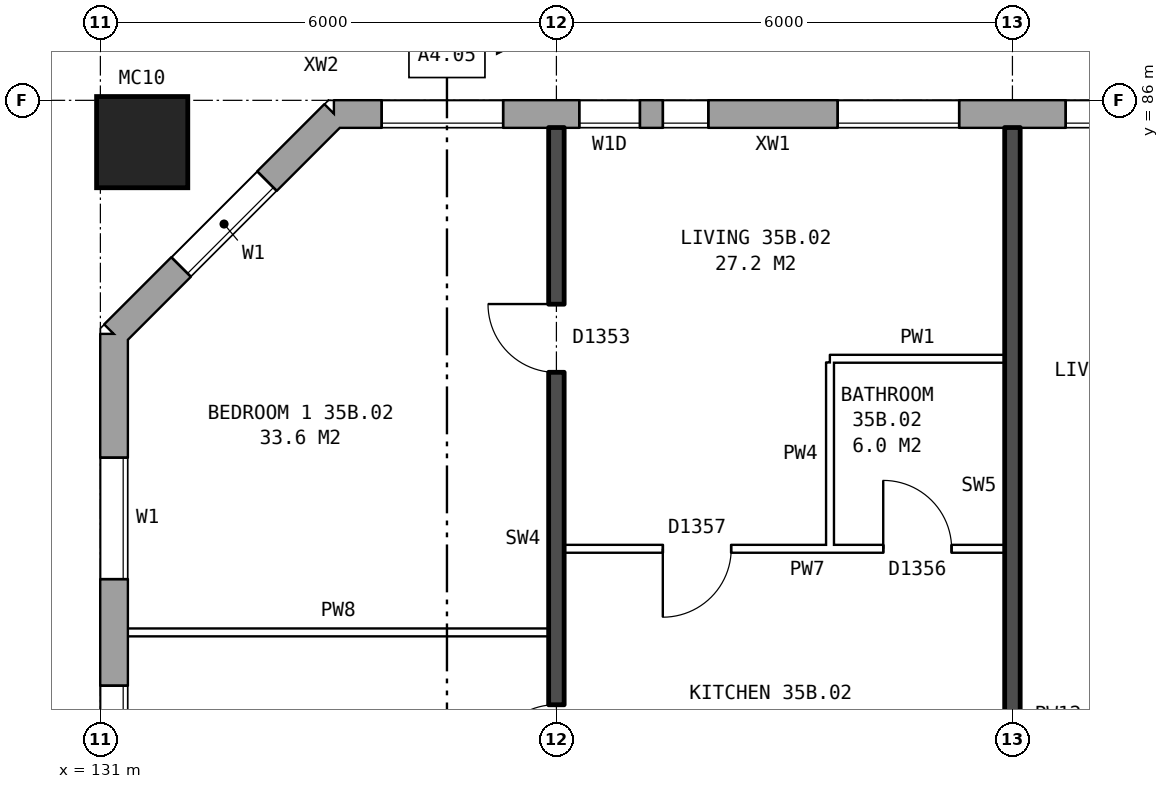
"""IFC4 building model, lengths in metres.
Left out: names, types, materials, properties, quantities, classifications, styles, units other than length and angle.
Written with IfcOpenShell. Run it as: python <this file> out.ifc"""

import sys

from ifc_helpers import new_model, si_unit, direction, frame, frame_2d, origin, origin_2d, place, context, subcontext, project, spatial, rectangle, hollow_rectangle, extrude, element, fill, save


model = new_model("IFC4")
c1 = context("Model", 3, precision=1e-05, world=origin(), true_north=direction((0.0, 1.0)))
c2 = subcontext(c1, "Body", "Model", "MODEL_VIEW")
j1 = project(units=[si_unit("LENGTHUNIT", "METRE"), si_unit("PLANEANGLEUNIT", "RADIAN")], contexts=[c1])
p1 = place(None, origin())
s1 = spatial("IfcSite", under=j1, at=p1, CompositionType="ELEMENT")
p2 = place(p1, origin())
s2 = spatial("IfcBuilding", under=s1, at=p2, CompositionType="ELEMENT")
p3 = place(p2, frame((0.0, 0.0, 126.8)))
s3 = spatial("IfcBuildingStorey", under=s2, at=p3, CompositionType="ELEMENT", Elevation=126.8)
p4 = place(p3, frame((131.55, 85.45, 0.0), z_axis=(0.0, 0.0, 1.0), x_axis=(1.0, 0.0, 0.0)))
e1 = element("IfcColumn", 1, at=p4, inside=s3, PredefinedType="COLUMN", context=c2, shape_type="SweptSolid", body=[
    extrude(hollow_rectangle(XDim=1.2, YDim=1.2, WallThickness=0.065, at=origin_2d()), origin(), (0.0, 0.0, 1.0), 3.1),
])
p5 = place(p3, frame((169.675, 85.82, 0.0), z_axis=(0.0, 0.0, 1.0), x_axis=(-1.0, 0.0, 0.0)))
e2 = element("IfcWall", 2, at=p5, inside=s3, PredefinedType="STANDARD", context=c2, shape_type="SweptSolid", body=[
    extrude(rectangle(XDim=35.601, YDim=0.36, at=frame_2d((17.8, 0.0))), origin(), (0.0, 0.0, 1.0), 2.85),
])
p6 = place(p5, frame((0.375, 0.0, 0.8)))
e3 = element("IfcOpeningElement", 3, at=p6, cuts=e2, PredefinedType="OPENING", context=c2, shape_type="SweptSolid", body=[
    extrude(rectangle(XDim=1.6, YDim=1.8, at=frame_2d((0.8, 0.9))), frame((0.0, 0.19, 0.0), z_axis=(0.0, -1.0, 0.0), x_axis=(1.0, 0.0, 0.0)), (0.0, 0.0, 1.0), 0.38),
])
p7 = place(p5, frame((2.875, 0.0, 0.8)))
e4 = element("IfcOpeningElement", 4, at=p7, cuts=e2, PredefinedType="OPENING", context=c2, shape_type="SweptSolid", body=[
    extrude(rectangle(XDim=1.0, YDim=1.8, at=frame_2d((0.5, 0.9))), frame((0.0, 0.19, 0.0), z_axis=(0.0, -1.0, 0.0), x_axis=(1.0, 0.0, 0.0)), (0.0, 0.0, 1.0), 0.38),
])
p8 = place(p5, frame((4.175, 0.0, 1.6)))
e5 = element("IfcOpeningElement", 5, at=p8, cuts=e2, PredefinedType="OPENING", context=c2, shape_type="SweptSolid", body=[
    extrude(rectangle(XDim=0.6, YDim=0.9, at=frame_2d((0.3, 0.45))), frame((0.0, 0.19, 0.0), z_axis=(0.0, -1.0, 0.0), x_axis=(1.0, 0.0, 0.0)), (0.0, 0.0, 1.0), 0.38),
])
p9 = place(p5, frame((9.375, 0.0, 0.8)))
e6 = element("IfcOpeningElement", 6, at=p9, cuts=e2, PredefinedType="OPENING", context=c2, shape_type="SweptSolid", body=[
    extrude(rectangle(XDim=1.6, YDim=1.8, at=frame_2d((0.8, 0.9))), frame((0.0, 0.19, 0.0), z_axis=(0.0, -1.0, 0.0), x_axis=(1.0, 0.0, 0.0)), (0.0, 0.0, 1.0), 0.38),
])
p10 = place(p5, frame((12.375, 0.0, 0.8)))
e7 = element("IfcOpeningElement", 7, at=p10, cuts=e2, PredefinedType="OPENING", context=c2, shape_type="SweptSolid", body=[
    extrude(rectangle(XDim=1.6, YDim=1.8, at=frame_2d((0.8, 0.9))), frame((0.0, 0.19, 0.0), z_axis=(0.0, -1.0, 0.0), x_axis=(1.0, 0.0, 0.0)), (0.0, 0.0, 1.0), 0.38),
])
p11 = place(p5, frame((15.375, 0.0, 0.8)))
e8 = element("IfcOpeningElement", 8, at=p11, cuts=e2, PredefinedType="OPENING", context=c2, shape_type="SweptSolid", body=[
    extrude(rectangle(XDim=1.6, YDim=1.8, at=frame_2d((0.8, 0.9))), frame((0.0, 0.19, 0.0), z_axis=(0.0, -1.0, 0.0), x_axis=(1.0, 0.0, 0.0)), (0.0, 0.0, 1.0), 0.38),
])
p12 = place(p5, frame((18.375, 0.0, 0.8)))
e9 = element("IfcOpeningElement", 9, at=p12, cuts=e2, PredefinedType="OPENING", context=c2, shape_type="SweptSolid", body=[
    extrude(rectangle(XDim=1.6, YDim=1.8, at=frame_2d((0.8, 0.9))), frame((0.0, 0.19, 0.0), z_axis=(0.0, -1.0, 0.0), x_axis=(1.0, 0.0, 0.0)), (0.0, 0.0, 1.0), 0.38),
])
p13 = place(p5, frame((21.375, 0.0, 0.8)))
e10 = element("IfcOpeningElement", 10, at=p13, cuts=e2, PredefinedType="OPENING", context=c2, shape_type="SweptSolid", body=[
    extrude(rectangle(XDim=1.6, YDim=1.8, at=frame_2d((0.8, 0.9))), frame((0.0, 0.19, 0.0), z_axis=(0.0, -1.0, 0.0), x_axis=(1.0, 0.0, 0.0)), (0.0, 0.0, 1.0), 0.38),
])
p14 = place(p5, frame((24.375, 0.0, 0.8)))
e11 = element("IfcOpeningElement", 11, at=p14, cuts=e2, PredefinedType="OPENING", context=c2, shape_type="SweptSolid", body=[
    extrude(rectangle(XDim=1.6, YDim=1.8, at=frame_2d((0.8, 0.9))), frame((0.0, 0.19, 0.0), z_axis=(0.0, -1.0, 0.0), x_axis=(1.0, 0.0, 0.0)), (0.0, 0.0, 1.0), 0.38),
])
p15 = place(p5, frame((27.375, 0.0, 0.8)))
e12 = element("IfcOpeningElement", 12, at=p15, cuts=e2, PredefinedType="OPENING", context=c2, shape_type="SweptSolid", body=[
    extrude(rectangle(XDim=1.6, YDim=1.8, at=frame_2d((0.8, 0.9))), frame((0.0, 0.19, 0.0), z_axis=(0.0, -1.0, 0.0), x_axis=(1.0, 0.0, 0.0)), (0.0, 0.0, 1.0), 0.38),
])
p16 = place(p5, frame((30.675, 0.0, 1.7)))
e13 = element("IfcOpeningElement", 13, at=p16, cuts=e2, PredefinedType="OPENING", context=c2, shape_type="SweptSolid", body=[
    extrude(rectangle(XDim=0.6, YDim=0.9, at=frame_2d((0.3, 0.45))), frame((0.0, 0.19, 0.0), z_axis=(0.0, -1.0, 0.0), x_axis=(1.0, 0.0, 0.0)), (0.0, 0.0, 1.0), 0.38),
])
p17 = place(p5, frame((33.375, 0.0, 0.8)))
e14 = element("IfcOpeningElement", 14, at=p17, cuts=e2, PredefinedType="OPENING", context=c2, shape_type="SweptSolid", body=[
    extrude(rectangle(XDim=1.6, YDim=1.8, at=frame_2d((0.8, 0.9))), frame((0.0, 0.19, 0.0), z_axis=(0.0, -1.0, 0.0), x_axis=(1.0, 0.0, 0.0)), (0.0, 0.0, 1.0), 0.38),
])
p18 = place(p5, frame((5.975, 0.0, 0.8)))
e15 = element("IfcOpeningElement", 15, at=p18, cuts=e2, PredefinedType="OPENING", context=c2, shape_type="SweptSolid", body=[
    extrude(rectangle(XDim=0.6, YDim=0.9, at=frame_2d((0.3, 0.45))), frame((0.0, 0.19, 0.0), z_axis=(0.0, -1.0, 0.0), x_axis=(1.0, 0.0, 0.0)), (0.0, 0.0, 1.0), 0.38),
])
p19 = place(p5, frame((6.875, 0.0, 0.8)))
e16 = element("IfcOpeningElement", 16, at=p19, cuts=e2, PredefinedType="OPENING", context=c2, shape_type="SweptSolid", body=[
    extrude(rectangle(XDim=1.6, YDim=1.8, at=frame_2d((0.8, 0.9))), frame((0.0, 0.19, 0.0), z_axis=(0.0, -1.0, 0.0), x_axis=(1.0, 0.0, 0.0)), (0.0, 0.0, 1.0), 0.38),
])
p20 = place(p5, frame((31.575, 0.0, 0.8)))
e17 = element("IfcOpeningElement", 17, at=p20, cuts=e2, PredefinedType="OPENING", context=c2, shape_type="SweptSolid", body=[
    extrude(rectangle(XDim=0.8, YDim=1.8, at=frame_2d((0.4, 0.9))), frame((0.0, 0.19, 0.0), z_axis=(0.0, -1.0, 0.0), x_axis=(1.0, 0.0, 0.0)), (0.0, 0.0, 1.0), 0.38),
])
p21 = place(p3, frame((134.075, 85.82, 0.0), z_axis=(0.0, 0.0, 1.0), x_axis=(-0.707106781187, -0.707106781187, 0.0)))
e18 = element("IfcWall", 18, at=p21, inside=s3, PredefinedType="STANDARD", context=c2, shape_type="SweptSolid", body=[
    extrude(rectangle(XDim=4.094, YDim=0.36, at=frame_2d((2.047, 0.0))), origin(), (0.0, 0.0, 1.0), 2.85),
])
p22 = place(p21, frame((1.247, 0.0, 0.8)))
e19 = element("IfcOpeningElement", 19, at=p22, cuts=e18, PredefinedType="OPENING", context=c2, shape_type="SweptSolid", body=[
    extrude(rectangle(XDim=1.6, YDim=1.8, at=frame_2d((0.8, 0.9))), frame((0.0, 0.19, 0.0), z_axis=(0.0, -1.0, 0.0), x_axis=(1.0, 0.0, 0.0)), (0.0, 0.0, 1.0), 0.38),
])
p23 = place(p3, frame((131.18, 82.925, 0.0), z_axis=(0.0, 0.0, 1.0), x_axis=(0.0, -1.0, 0.0)))
e20 = element("IfcWall", 20, at=p23, inside=s3, PredefinedType="STANDARD", context=c2, shape_type="SweptSolid", body=[
    extrude(rectangle(XDim=25.851, YDim=0.36, at=frame_2d((12.925, 0.0))), origin(), (0.0, 0.0, 1.0), 2.85),
])
p24 = place(p23, frame((1.625, 0.0, 0.8)))
e21 = element("IfcOpeningElement", 21, at=p24, cuts=e20, PredefinedType="OPENING", context=c2, shape_type="SweptSolid", body=[
    extrude(rectangle(XDim=1.6, YDim=1.8, at=frame_2d((0.8, 0.9))), frame((0.0, 0.19, 0.0), z_axis=(0.0, -1.0, 0.0), x_axis=(1.0, 0.0, 0.0)), (0.0, 0.0, 1.0), 0.38),
])
p25 = place(p23, frame((4.625, 0.0, 0.8)))
e22 = element("IfcOpeningElement", 22, at=p25, cuts=e20, PredefinedType="OPENING", context=c2, shape_type="SweptSolid", body=[
    extrude(rectangle(XDim=1.6, YDim=1.8, at=frame_2d((0.8, 0.9))), frame((0.0, 0.19, 0.0), z_axis=(0.0, -1.0, 0.0), x_axis=(1.0, 0.0, 0.0)), (0.0, 0.0, 1.0), 0.38),
])
p26 = place(p23, frame((19.625, 0.0, 0.8)))
e23 = element("IfcOpeningElement", 23, at=p26, cuts=e20, PredefinedType="OPENING", context=c2, shape_type="SweptSolid", body=[
    extrude(rectangle(XDim=1.6, YDim=1.8, at=frame_2d((0.8, 0.9))), frame((0.0, 0.19, 0.0), z_axis=(0.0, -1.0, 0.0), x_axis=(1.0, 0.0, 0.0)), (0.0, 0.0, 1.0), 0.38),
])
p27 = place(p23, frame((22.625, 0.0, 0.8)))
e24 = element("IfcOpeningElement", 24, at=p27, cuts=e20, PredefinedType="OPENING", context=c2, shape_type="SweptSolid", body=[
    extrude(rectangle(XDim=1.6, YDim=1.8, at=frame_2d((0.8, 0.9))), frame((0.0, 0.19, 0.0), z_axis=(0.0, -1.0, 0.0), x_axis=(1.0, 0.0, 0.0)), (0.0, 0.0, 1.0), 0.38),
])
p28 = place(p3, frame((131.36, 79.0, 0.0), z_axis=(0.0, 0.0, 1.0), x_axis=(1.0, 0.0, 0.0)))
e25 = element("IfcWall", 25, at=p28, inside=s3, PredefinedType="PARTITIONING", context=c2, shape_type="SweptSolid", body=[
    extrude(rectangle(XDim=5.54, YDim=0.1, at=frame_2d((2.77, 0.0))), origin(), (0.0, 0.0, 1.0), 2.85),
])
p29 = place(p3, frame((137.1, 80.1, 0.0), z_axis=(0.0, 0.0, 1.0), x_axis=(1.0, 0.0, 0.0)))
e26 = element("IfcWall", 26, at=p29, inside=s3, PredefinedType="PARTITIONING", context=c2, shape_type="SweptSolid", body=[
    extrude(rectangle(XDim=5.8, YDim=0.1, at=frame_2d((2.9, 0.0))), origin(), (0.0, 0.0, 1.0), 2.85),
])
p30 = place(p29, frame((1.3, 0.0, 0.0)))
e27 = element("IfcOpeningElement", 27, at=p30, cuts=e26, PredefinedType="OPENING", context=c2, shape_type="SweptSolid", body=[
    extrude(rectangle(XDim=0.9, YDim=2.1, at=frame_2d((0.45, 1.05))), frame((0.0, 0.06, 0.0), z_axis=(0.0, -1.0, 0.0), x_axis=(1.0, 0.0, 0.0)), (0.0, 0.0, 1.0), 0.12),
])
p31 = place(p29, frame((4.2, 0.0, 0.0)))
e28 = element("IfcOpeningElement", 28, at=p31, cuts=e26, PredefinedType="OPENING", context=c2, shape_type="SweptSolid", body=[
    extrude(rectangle(XDim=0.9, YDim=2.1, at=frame_2d((0.45, 1.05))), frame((0.0, 0.06, 0.0), z_axis=(0.0, -1.0, 0.0), x_axis=(1.0, 0.0, 0.0)), (0.0, 0.0, 1.0), 0.12),
])
p32 = place(p3, frame((140.6, 82.6, 0.0), z_axis=(0.0, 0.0, 1.0), x_axis=(1.0, 0.0, 0.0)))
e29 = element("IfcWall", 29, at=p32, inside=s3, PredefinedType="PARTITIONING", context=c2, shape_type="SweptSolid", body=[
    extrude(rectangle(XDim=2.3, YDim=0.1, at=frame_2d((1.15, 0.0))), origin(), (0.0, 0.0, 1.0), 2.85),
])
p33 = place(p3, frame((137.0, 76.2, 0.0), z_axis=(0.0, 0.0, 1.0), x_axis=(0.0, 1.0, 0.0)))
e30 = element("IfcWall", 30, at=p33, inside=s3, PredefinedType="SOLIDWALL", context=c2, shape_type="SweptSolid", body=[
    extrude(rectangle(XDim=9.44, YDim=0.2, at=frame_2d((4.72, 0.0))), origin(), (0.0, 0.0, 1.0), 2.85),
])
p34 = place(p33, frame((6.22, 0.0, 0.0)))
e31 = element("IfcOpeningElement", 31, at=p34, cuts=e30, PredefinedType="OPENING", context=c2, shape_type="SweptSolid", body=[
    extrude(rectangle(XDim=0.9, YDim=2.1, at=frame_2d((0.45, 1.05))), frame((0.0, 0.11, 0.0), z_axis=(0.0, -1.0, 0.0), x_axis=(1.0, 0.0, 0.0)), (0.0, 0.0, 1.0), 0.22),
])
p35 = place(p33, frame((0.95, 0.0, 0.0)))
e32 = element("IfcOpeningElement", 32, at=p35, cuts=e30, PredefinedType="OPENING", context=c2, shape_type="SweptSolid", body=[
    extrude(rectangle(XDim=0.9, YDim=2.1, at=frame_2d((0.45, 1.05))), frame((0.0, 0.11, 0.0), z_axis=(0.0, -1.0, 0.0), x_axis=(1.0, 0.0, 0.0)), (0.0, 0.0, 1.0), 0.22),
])
p36 = place(p3, frame((140.6, 80.15, 0.0), z_axis=(0.0, 0.0, 1.0), x_axis=(0.0, 1.0, 0.0)))
e33 = element("IfcWall", 33, at=p36, inside=s3, PredefinedType="PARTITIONING", context=c2, shape_type="SweptSolid", body=[
    extrude(rectangle(XDim=2.4, YDim=0.1, at=frame_2d((1.2, 0.0))), origin(), (0.0, 0.0, 1.0), 2.85),
])
p37 = place(p3, frame((143.0, 76.2, 0.0), z_axis=(0.0, 0.0, 1.0), x_axis=(0.0, 1.0, 0.0)))
e34 = element("IfcWall", 34, at=p37, inside=s3, PredefinedType="SOLIDWALL", context=c2, shape_type="SweptSolid", body=[
    extrude(rectangle(XDim=9.44, YDim=0.2, at=frame_2d((4.72, 0.0))), origin(), (0.0, 0.0, 1.0), 2.85),
])
p38 = place(p14, origin())
e35 = element("IfcWindow", 35, at=p38, inside=s3, PartitioningType="SINGLE_PANEL", PredefinedType="WINDOW", context=c2, shape_type="SweptSolid", body=[
    extrude(rectangle(XDim=1.6, YDim=1.8, at=frame_2d((0.8, 0.9))), frame((0.0, 0.15, 0.0), z_axis=(0.0, -1.0, 0.0), x_axis=(1.0, 0.0, 0.0)), (0.0, 0.0, 1.0), 0.06),
])
fill(e11, e35)
p39 = place(p15, origin())
e36 = element("IfcWindow", 36, at=p39, inside=s3, PartitioningType="SINGLE_PANEL", PredefinedType="WINDOW", context=c2, shape_type="SweptSolid", body=[
    extrude(rectangle(XDim=1.6, YDim=1.8, at=frame_2d((0.8, 0.9))), frame((0.0, 0.15, 0.0), z_axis=(0.0, -1.0, 0.0), x_axis=(1.0, 0.0, 0.0)), (0.0, 0.0, 1.0), 0.06),
])
fill(e12, e36)
p40 = place(p16, origin())
e37 = element("IfcWindow", 37, at=p40, inside=s3, PartitioningType="SINGLE_PANEL", PredefinedType="WINDOW", context=c2, shape_type="SweptSolid", body=[
    extrude(rectangle(XDim=0.6, YDim=0.9, at=frame_2d((0.3, 0.45))), frame((0.0, 0.15, 0.0), z_axis=(0.0, -1.0, 0.0), x_axis=(1.0, 0.0, 0.0)), (0.0, 0.0, 1.0), 0.06),
])
fill(e13, e37)
p41 = place(p17, origin())
e38 = element("IfcWindow", 38, at=p41, inside=s3, PartitioningType="SINGLE_PANEL", PredefinedType="WINDOW", context=c2, shape_type="SweptSolid", body=[
    extrude(rectangle(XDim=1.6, YDim=1.8, at=frame_2d((0.8, 0.9))), frame((0.0, 0.15, 0.0), z_axis=(0.0, -1.0, 0.0), x_axis=(1.0, 0.0, 0.0)), (0.0, 0.0, 1.0), 0.06),
])
fill(e14, e38)
p42 = place(p22, origin())
e39 = element("IfcWindow", 39, at=p42, inside=s3, PartitioningType="SINGLE_PANEL", PredefinedType="WINDOW", context=c2, shape_type="SweptSolid", body=[
    extrude(rectangle(XDim=1.6, YDim=1.8, at=frame_2d((0.8, 0.9))), frame((0.0, 0.15, 0.0), z_axis=(0.0, -1.0, 0.0), x_axis=(1.0, 0.0, 0.0)), (0.0, 0.0, 1.0), 0.06),
])
fill(e19, e39)
p43 = place(p24, origin())
e40 = element("IfcWindow", 40, at=p43, inside=s3, PartitioningType="SINGLE_PANEL", PredefinedType="WINDOW", context=c2, shape_type="SweptSolid", body=[
    extrude(rectangle(XDim=1.6, YDim=1.8, at=frame_2d((0.8, 0.9))), frame((0.0, 0.15, 0.0), z_axis=(0.0, -1.0, 0.0), x_axis=(1.0, 0.0, 0.0)), (0.0, 0.0, 1.0), 0.06),
])
fill(e21, e40)
p44 = place(p25, origin())
e41 = element("IfcWindow", 41, at=p44, inside=s3, PartitioningType="SINGLE_PANEL", PredefinedType="WINDOW", context=c2, shape_type="SweptSolid", body=[
    extrude(rectangle(XDim=1.6, YDim=1.8, at=frame_2d((0.8, 0.9))), frame((0.0, 0.15, 0.0), z_axis=(0.0, -1.0, 0.0), x_axis=(1.0, 0.0, 0.0)), (0.0, 0.0, 1.0), 0.06),
])
fill(e22, e41)
p45 = place(p34, origin())
e42 = element("IfcDoor", 42, at=p45, inside=s3, OperationType="SINGLE_SWING_RIGHT", PredefinedType="DOOR", context=c2, shape_type="SweptSolid", body=[
    extrude(rectangle(XDim=0.9, YDim=2.1, at=frame_2d((0.45, 1.05))), frame((0.0, 0.025, 0.0), z_axis=(0.0, -1.0, 0.0), x_axis=(1.0, 0.0, 0.0)), (0.0, 0.0, 1.0), 0.05),
])
fill(e31, e42)
p46 = place(p35, origin())
e43 = element("IfcDoor", 43, at=p46, inside=s3, OperationType="SINGLE_SWING_LEFT", PredefinedType="DOOR", context=c2, shape_type="SweptSolid", body=[
    extrude(rectangle(XDim=0.9, YDim=2.1, at=frame_2d((0.45, 1.05))), frame((0.0, 0.025, 0.0), z_axis=(0.0, -1.0, 0.0), x_axis=(1.0, 0.0, 0.0)), (0.0, 0.0, 1.0), 0.05),
])
fill(e32, e43)
p47 = place(p30, frame((0.9, 0.0, 0.0), z_axis=(0.0, 0.0, 1.0), x_axis=(-1.0, 0.0, 0.0)))
e44 = element("IfcDoor", 44, at=p47, inside=s3, OperationType="SINGLE_SWING_RIGHT", PredefinedType="DOOR", context=c2, shape_type="SweptSolid", body=[
    extrude(rectangle(XDim=0.9, YDim=2.1, at=frame_2d((0.45, 1.05))), frame((0.0, 0.025, 0.0), z_axis=(0.0, -1.0, 0.0), x_axis=(1.0, 0.0, 0.0)), (0.0, 0.0, 1.0), 0.05),
])
fill(e27, e44)
p48 = place(p31, origin())
e45 = element("IfcDoor", 45, at=p48, inside=s3, OperationType="SINGLE_SWING_LEFT", PredefinedType="DOOR", context=c2, shape_type="SweptSolid", body=[
    extrude(rectangle(XDim=0.9, YDim=2.1, at=frame_2d((0.45, 1.05))), frame((0.0, 0.025, 0.0), z_axis=(0.0, -1.0, 0.0), x_axis=(1.0, 0.0, 0.0)), (0.0, 0.0, 1.0), 0.05),
])
fill(e28, e45)
p49 = place(p20, origin())
e46 = element("IfcWindow", 46, at=p49, inside=s3, PartitioningType="SINGLE_PANEL", PredefinedType="WINDOW", context=c2, shape_type="SweptSolid", body=[
    extrude(rectangle(XDim=0.8, YDim=1.8, at=frame_2d((0.4, 0.9))), frame((0.0, 0.15, 0.0), z_axis=(0.0, -1.0, 0.0), x_axis=(1.0, 0.0, 0.0)), (0.0, 0.0, 1.0), 0.06),
])
fill(e17, e46)
save(model, sys.argv[1])
